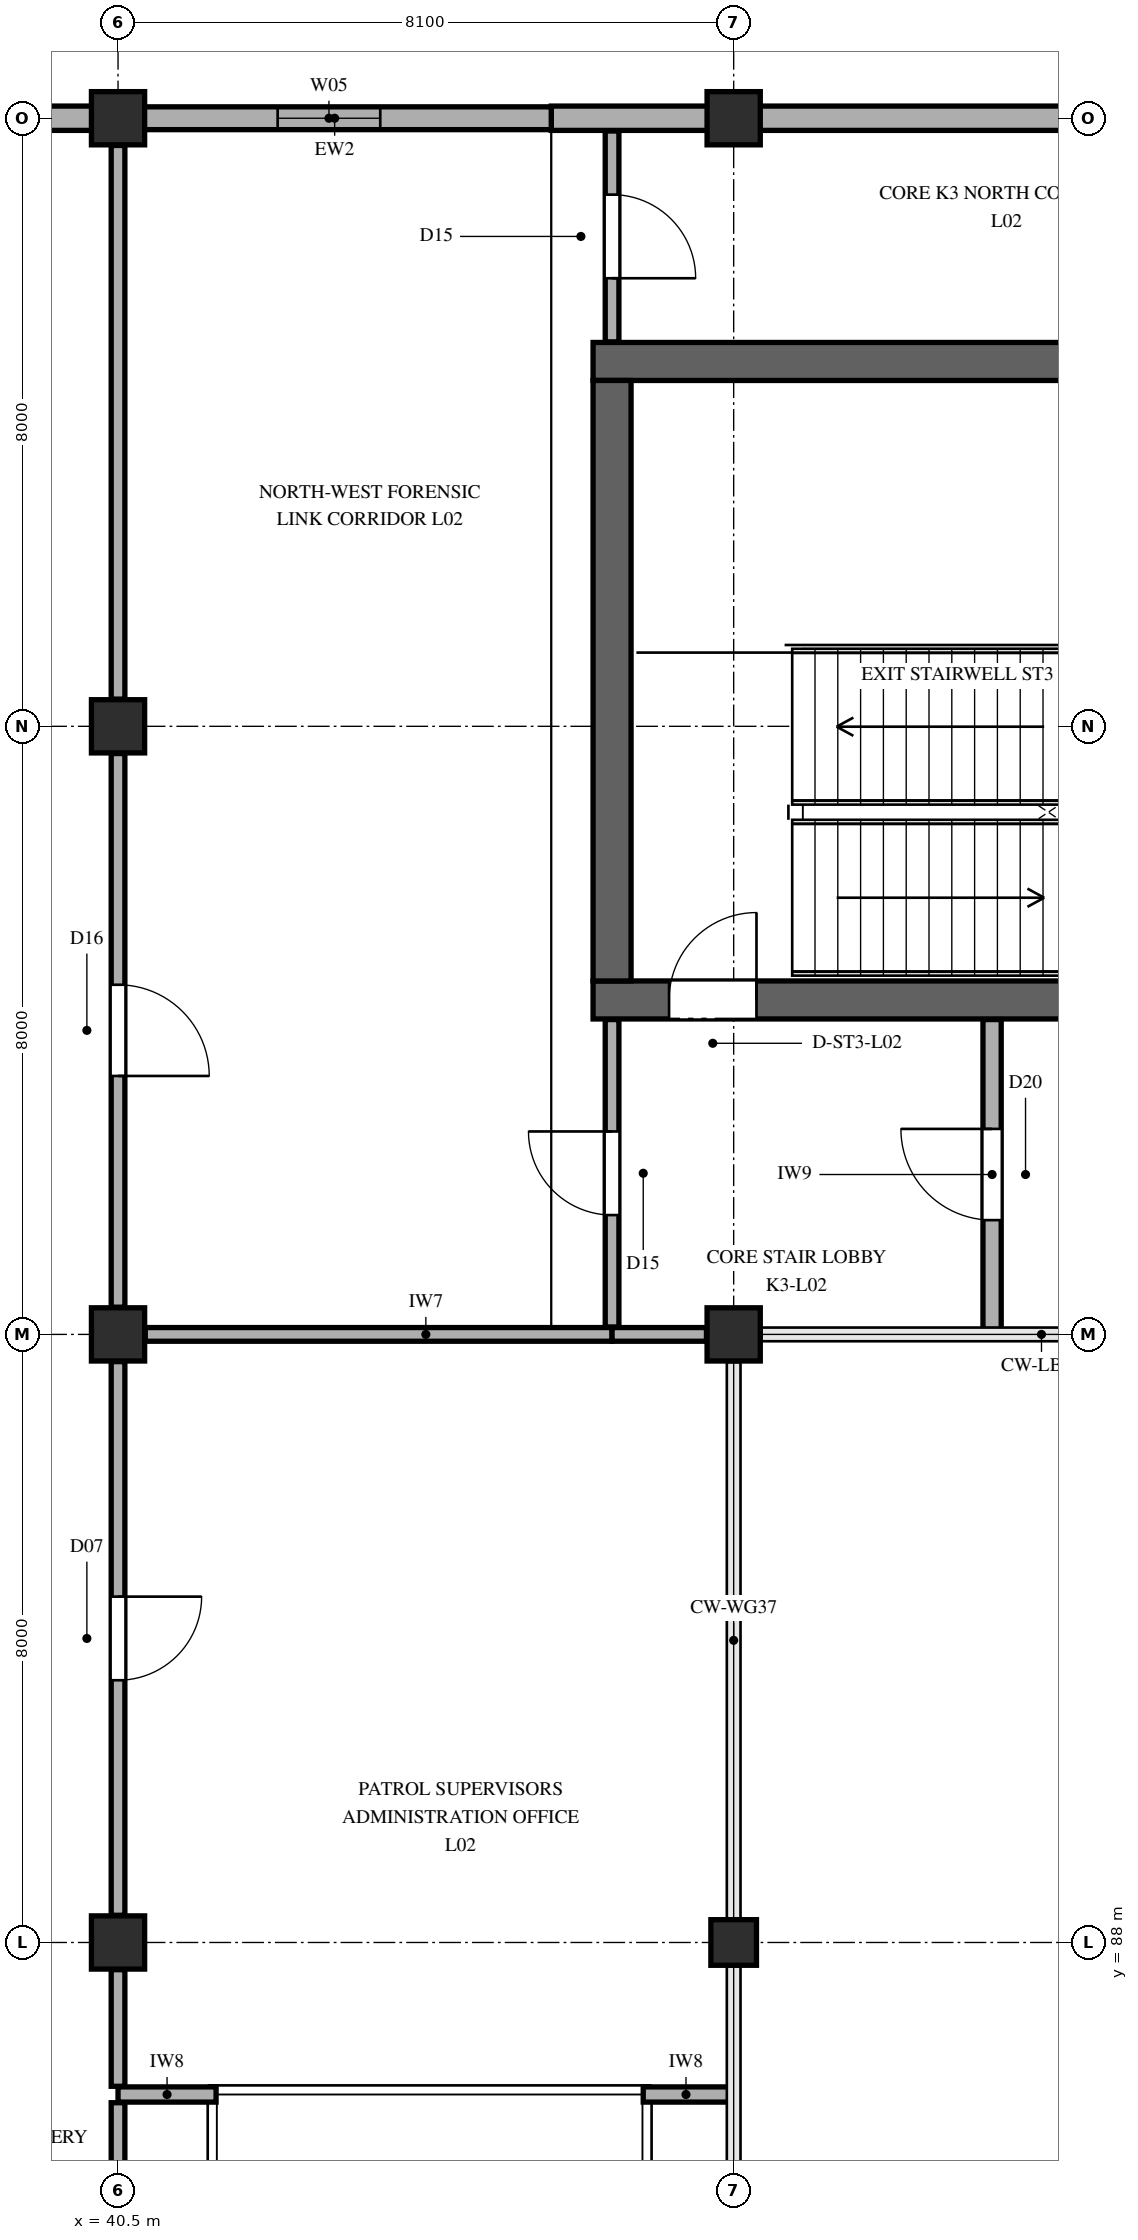
"""IFC4 building model, lengths in metres.
Left out: names, types, materials, properties, quantities, classifications, styles, units other than length and angle.
Written with IfcOpenShell. Run it as: python <this file> out.ifc"""

import sys

from ifc_helpers import new_model, si_unit, direction, frame, frame_2d, origin, origin_2d, place, context, subcontext, project, spatial, rectangle, extrude, element, fill, save


model = new_model("IFC4")
c1 = context("Model", 3, precision=1e-05, world=origin(), true_north=direction((0.0, 1.0)))
c2 = subcontext(c1, "Body", "Model", "MODEL_VIEW")
j1 = project(units=[si_unit("LENGTHUNIT", "METRE"), si_unit("PLANEANGLEUNIT", "RADIAN")], contexts=[c1])
p1 = place(None, origin())
s1 = spatial("IfcSite", under=j1, at=p1, CompositionType="ELEMENT")
p2 = place(p1, origin())
s2 = spatial("IfcBuilding", under=s1, at=p2, CompositionType="ELEMENT")
p3 = place(p2, frame((0.0, 0.0, 10.2)))
s3 = spatial("IfcBuildingStorey", under=s2, at=p3, CompositionType="ELEMENT", Elevation=10.2)
p4 = place(p3, frame((46.75, 100.4, 0.0), z_axis=(0.0, 0.0, 1.0), x_axis=(1.0, 0.0, 0.0)))
e1 = element("IfcWall", 1, at=p4, inside=s3, PredefinedType="SHEAR", context=c2, shape_type="SweptSolid", body=[
    extrude(rectangle(XDim=15.3, YDim=0.5, at=frame_2d((7.65, 0.0))), origin(), (0.0, 0.0, 1.0), 4.5),
])
p5 = place(p4, frame((1.0, 0.0, 0.0)))
e2 = element("IfcOpeningElement", 2, at=p5, cuts=e1, PredefinedType="OPENING", context=c2, shape_type="SweptSolid", body=[
    extrude(rectangle(XDim=1.15, YDim=2.25, at=frame_2d((0.575, 1.125))), frame((0.0, 0.26, 0.0), z_axis=(0.0, -1.0, 0.0), x_axis=(1.0, 0.0, 0.0)), (0.0, 0.0, 1.0), 0.52),
])
p6 = place(p4, frame((10.282, 0.0, 0.0)))
e3 = element("IfcOpeningElement", 3, at=p6, cuts=e1, PredefinedType="OPENING", context=c2, shape_type="SweptSolid", body=[
    extrude(rectangle(XDim=1.1, YDim=2.2, at=frame_2d((0.55, 1.1))), frame((0.0, 0.26, 0.0), z_axis=(0.0, -1.0, 0.0), x_axis=(1.0, 0.0, 0.0)), (0.0, 0.0, 1.0), 0.52),
])
p7 = place(p4, frame((12.998, 0.0, 0.0)))
e4 = element("IfcOpeningElement", 4, at=p7, cuts=e1, PredefinedType="OPENING", context=c2, shape_type="SweptSolid", body=[
    extrude(rectangle(XDim=1.1, YDim=2.2, at=frame_2d((0.55, 1.1))), frame((0.0, 0.26, 0.0), z_axis=(0.0, -1.0, 0.0), x_axis=(1.0, 0.0, 0.0)), (0.0, 0.0, 1.0), 0.52),
])
p8 = place(p3, frame((46.75, 108.8, 0.0), z_axis=(0.0, 0.0, 1.0), x_axis=(1.0, 0.0, 0.0)))
e5 = element("IfcWall", 5, at=p8, inside=s3, PredefinedType="SHEAR", context=c2, shape_type="SweptSolid", body=[
    extrude(rectangle(XDim=15.3, YDim=0.5, at=frame_2d((7.65, 0.0))), origin(), (0.0, 0.0, 1.0), 4.5),
])
p9 = place(p3, frame((47.0, 100.65, 0.0), z_axis=(0.0, 0.0, 1.0), x_axis=(0.0, 1.0, 0.0)))
e6 = element("IfcWall", 6, at=p9, inside=s3, PredefinedType="SHEAR", context=c2, shape_type="SweptSolid", body=[
    extrude(rectangle(XDim=7.9, YDim=0.5, at=frame_2d((3.95, 0.0))), origin(), (0.0, 0.0, 1.0), 4.5),
])
for number, where, z_axis, x_axis in (
    (7, (40.5, 88.0, 0.0), (0.0, 0.0, 1.0), (1.0, 0.0, 0.0)),
    (8, (40.5, 96.0, 0.0), (0.0, 0.0, 1.0), (1.0, 0.0, 0.0)),
    (9, (40.5, 104.0, 0.0), (0.0, 0.0, 1.0), (1.0, 0.0, 0.0)),
    (10, (40.5, 112.0, 0.0), (0.0, 0.0, 1.0), (1.0, 0.0, 0.0)),
):
    element("IfcColumn", number, at=place(p3, frame(where, z_axis=z_axis, x_axis=x_axis)), inside=s3, PredefinedType="COLUMN", context=c2, shape_type="SweptSolid", body=[
        extrude(rectangle(XDim=0.7, YDim=0.7, at=origin_2d()), origin(), (0.0, 0.0, 1.0), 4.5),
    ])
p10 = place(p3, frame((48.6, 88.0, 0.0), z_axis=(0.0, 0.0, 1.0), x_axis=(1.0, 0.0, 0.0)))
e11 = element("IfcColumn", 11, at=p10, inside=s3, PredefinedType="COLUMN", context=c2, shape_type="SweptSolid", body=[
    extrude(rectangle(XDim=0.6, YDim=0.6, at=origin_2d()), origin(), (0.0, 0.0, 1.0), 4.5),
])
for number, where, z_axis, x_axis in (
    (12, (48.6, 96.0, 0.0), (0.0, 0.0, 1.0), (1.0, 0.0, 0.0)),
    (13, (48.6, 112.0, 0.0), (0.0, 0.0, 1.0), (1.0, 0.0, 0.0)),
):
    element("IfcColumn", number, at=place(p3, frame(where, z_axis=z_axis, x_axis=x_axis)), inside=s3, PredefinedType="COLUMN", context=c2, shape_type="SweptSolid", body=[
        extrude(rectangle(XDim=0.7, YDim=0.7, at=origin_2d()), origin(), (0.0, 0.0, 1.0), 4.5),
    ])
p11 = place(p3, frame((62.775, 112.0, 0.0), z_axis=(0.0, 0.0, 1.0), x_axis=(-1.0, 0.0, 0.0)))
e14 = element("IfcWall", 14, at=p11, inside=s3, PredefinedType="SOLIDWALL", context=c2, shape_type="SweptSolid", body=[
    extrude(rectangle(XDim=14.175, YDim=0.32, at=frame_2d((7.087, 0.0))), origin(), (0.0, 0.0, 1.0), 3.632),
])
p12 = place(p11, frame((8.55, 0.0, 0.95)))
e15 = element("IfcOpeningElement", 15, at=p12, cuts=e14, PredefinedType="OPENING", context=c2, shape_type="SweptSolid", body=[
    extrude(rectangle(XDim=1.2, YDim=1.8, at=frame_2d((0.6, 0.9))), frame((0.0, 0.17, 0.0), z_axis=(0.0, -1.0, 0.0), x_axis=(1.0, 0.0, 0.0)), (0.0, 0.0, 1.0), 0.34),
])
p13 = place(p3, frame((48.6, 112.0, 0.0), z_axis=(0.0, 0.0, 1.0), x_axis=(-1.0, 0.0, 0.0)))
e16 = element("IfcWall", 16, at=p13, inside=s3, PredefinedType="SOLIDWALL", context=c2, shape_type="SweptSolid", body=[
    extrude(rectangle(XDim=2.4, YDim=0.32, at=frame_2d((1.2, 0.0))), origin(), (0.0, 0.0, 1.0), 3.699),
])
p14 = place(p3, frame((46.2, 112.0, 0.0), z_axis=(0.0, 0.0, 1.0), x_axis=(-1.0, 0.0, 0.0)))
e17 = element("IfcWall", 17, at=p14, inside=s3, PredefinedType="SOLIDWALL", context=c2, shape_type="SweptSolid", body=[
    extrude(rectangle(XDim=5.7, YDim=0.3, at=frame_2d((2.85, 0.0))), origin(), (0.0, 0.0, 1.0), 3.699),
])
p15 = place(p14, frame((2.25, 0.0, 0.95)))
e18 = element("IfcOpeningElement", 18, at=p15, cuts=e17, PredefinedType="OPENING", context=c2, shape_type="SweptSolid", body=[
    extrude(rectangle(XDim=1.35, YDim=1.8, at=frame_2d((0.675, 0.9))), frame((0.0, 0.16, 0.0), z_axis=(0.0, -1.0, 0.0), x_axis=(1.0, 0.0, 0.0)), (0.0, 0.0, 1.0), 0.32),
])
p16 = place(p3, frame((40.5, 112.0, 0.0), z_axis=(0.0, 0.0, 1.0), x_axis=(-1.0, 0.0, 0.0)))
e19 = element("IfcWall", 19, at=p16, inside=s3, PredefinedType="SOLIDWALL", context=c2, shape_type="SweptSolid", body=[
    extrude(rectangle(XDim=12.15, YDim=0.32, at=frame_2d((6.075, 0.0))), origin(), (0.0, 0.0, 1.0), 3.632),
])
p17 = place(p16, frame((5.4, 0.0, 0.85)))
e20 = element("IfcOpeningElement", 20, at=p17, cuts=e19, PredefinedType="OPENING", context=c2, shape_type="SweptSolid", body=[
    extrude(rectangle(XDim=1.35, YDim=2.1, at=frame_2d((0.675, 1.05))), frame((0.0, 0.17, 0.0), z_axis=(0.0, -1.0, 0.0), x_axis=(1.0, 0.0, 0.0)), (0.0, 0.0, 1.0), 0.34),
])
p18 = place(p3, frame((40.5, 86.0, 0.0), z_axis=(0.0, 0.0, 1.0), x_axis=(1.0, 0.0, 0.0)))
e21 = element("IfcWall", 21, at=p18, inside=s3, PredefinedType="PARTITIONING", context=c2, shape_type="SweptSolid", body=[
    extrude(rectangle(XDim=1.29, YDim=0.2, at=frame_2d((0.645, 0.0))), origin(), (0.0, 0.0, 1.0), 4.24),
])
p19 = place(p3, frame((47.41, 86.0, 0.0), z_axis=(0.0, 0.0, 1.0), x_axis=(1.0, 0.0, 0.0)))
e22 = element("IfcWall", 22, at=p19, inside=s3, PredefinedType="PARTITIONING", context=c2, shape_type="SweptSolid", body=[
    extrude(rectangle(XDim=1.125, YDim=0.2, at=frame_2d((0.562, 0.0))), origin(), (0.0, 0.0, 1.0), 4.24),
])
p20 = place(p3, frame((40.858, 96.0, 0.0), z_axis=(0.0, 0.0, 1.0), x_axis=(1.0, 0.0, 0.0)))
e23 = element("IfcWall", 23, at=p20, inside=s3, PredefinedType="PARTITIONING", context=c2, shape_type="SweptSolid", body=[
    extrude(rectangle(XDim=6.142, YDim=0.18, at=frame_2d((3.071, 0.0))), origin(), (0.0, 0.0, 1.0), 3.632),
])
p21 = place(p3, frame((47.0, 96.0, 0.0), z_axis=(0.0, 0.0, 1.0), x_axis=(1.0, 0.0, 0.0)))
e24 = element("IfcWall", 24, at=p21, inside=s3, PredefinedType="PARTITIONING", context=c2, shape_type="SweptSolid", body=[
    extrude(rectangle(XDim=1.242, YDim=0.18, at=frame_2d((0.621, 0.0))), origin(), (0.0, 0.0, 1.0), 3.632),
])
p22 = place(p3, frame((40.5, 80.358, 0.0), z_axis=(0.0, 0.0, 1.0), x_axis=(0.0, 1.0, 0.0)))
e25 = element("IfcWall", 25, at=p22, inside=s3, PredefinedType="PARTITIONING", context=c2, shape_type="SweptSolid", body=[
    extrude(rectangle(XDim=5.534, YDim=0.18, at=frame_2d((2.767, 0.0))), origin(), (0.0, 0.0, 1.0), 3.769),
])
p23 = place(p3, frame((40.5, 86.108, 0.0), z_axis=(0.0, 0.0, 1.0), x_axis=(0.0, 1.0, 0.0)))
e26 = element("IfcWall", 26, at=p23, inside=s3, PredefinedType="PARTITIONING", context=c2, shape_type="SweptSolid", body=[
    extrude(rectangle(XDim=1.534, YDim=0.18, at=frame_2d((0.767, 0.0))), origin(), (0.0, 0.0, 1.0), 3.769),
])
p24 = place(p3, frame((40.5, 88.358, 0.0), z_axis=(0.0, 0.0, 1.0), x_axis=(0.0, 1.0, 0.0)))
e27 = element("IfcWall", 27, at=p24, inside=s3, PredefinedType="PARTITIONING", context=c2, shape_type="SweptSolid", body=[
    extrude(rectangle(XDim=7.284, YDim=0.18, at=frame_2d((3.642, 0.0))), origin(), (0.0, 0.0, 1.0), 3.732),
])
p25 = place(p24, frame((3.092, 0.0, 0.0)))
e28 = element("IfcOpeningElement", 28, at=p25, cuts=e27, PredefinedType="OPENING", context=c2, shape_type="SweptSolid", body=[
    extrude(rectangle(XDim=1.1, YDim=2.2, at=frame_2d((0.55, 1.1))), frame((0.0, 0.1, 0.0), z_axis=(0.0, -1.0, 0.0), x_axis=(1.0, 0.0, 0.0)), (0.0, 0.0, 1.0), 0.2),
])
p26 = place(p3, frame((40.5, 96.358, 0.0), z_axis=(0.0, 0.0, 1.0), x_axis=(0.0, 1.0, 0.0)))
e29 = element("IfcWall", 29, at=p26, inside=s3, PredefinedType="PARTITIONING", context=c2, shape_type="SweptSolid", body=[
    extrude(rectangle(XDim=7.284, YDim=0.18, at=frame_2d((3.642, 0.0))), origin(), (0.0, 0.0, 1.0), 3.769),
])
p27 = place(p26, frame((3.042, 0.0, 0.0)))
e30 = element("IfcOpeningElement", 30, at=p27, cuts=e29, PredefinedType="OPENING", context=c2, shape_type="SweptSolid", body=[
    extrude(rectangle(XDim=1.2, YDim=2.2, at=frame_2d((0.6, 1.1))), frame((0.0, 0.1, 0.0), z_axis=(0.0, -1.0, 0.0), x_axis=(1.0, 0.0, 0.0)), (0.0, 0.0, 1.0), 0.2),
])
p28 = place(p3, frame((40.5, 104.358, 0.0), z_axis=(0.0, 0.0, 1.0), x_axis=(0.0, 1.0, 0.0)))
e31 = element("IfcWall", 31, at=p28, inside=s3, PredefinedType="PARTITIONING", context=c2, shape_type="SweptSolid", body=[
    extrude(rectangle(XDim=7.284, YDim=0.18, at=frame_2d((3.642, 0.0))), origin(), (0.0, 0.0, 1.0), 3.769),
])
p29 = place(p3, frame((47.0, 96.098, 0.0), z_axis=(0.0, 0.0, 1.0), x_axis=(0.0, 1.0, 0.0)))
e32 = element("IfcWall", 32, at=p29, inside=s3, PredefinedType="PARTITIONING", context=c2, shape_type="SweptSolid", body=[
    extrude(rectangle(XDim=4.044, YDim=0.18, at=frame_2d((2.022, 0.0))), origin(), (0.0, 0.0, 1.0), 4.24),
])
p30 = place(p29, frame((1.472, 0.0, 0.0)))
e33 = element("IfcOpeningElement", 33, at=p30, cuts=e32, PredefinedType="OPENING", context=c2, shape_type="SweptSolid", body=[
    extrude(rectangle(XDim=1.1, YDim=2.2, at=frame_2d((0.55, 1.1))), frame((0.0, 0.1, 0.0), z_axis=(0.0, -1.0, 0.0), x_axis=(1.0, 0.0, 0.0)), (0.0, 0.0, 1.0), 0.2),
])
p31 = place(p3, frame((47.0, 109.058, 0.0), z_axis=(0.0, 0.0, 1.0), x_axis=(0.0, 1.0, 0.0)))
e34 = element("IfcWall", 34, at=p31, inside=s3, PredefinedType="PARTITIONING", context=c2, shape_type="SweptSolid", body=[
    extrude(rectangle(XDim=2.774, YDim=0.18, at=frame_2d((1.387, 0.0))), origin(), (0.0, 0.0, 1.0), 4.24),
])
p32 = place(p31, frame((0.837, 0.0, 0.0)))
e35 = element("IfcOpeningElement", 35, at=p32, cuts=e34, PredefinedType="OPENING", context=c2, shape_type="SweptSolid", body=[
    extrude(rectangle(XDim=1.1, YDim=2.2, at=frame_2d((0.55, 1.1))), frame((0.0, 0.1, 0.0), z_axis=(0.0, -1.0, 0.0), x_axis=(1.0, 0.0, 0.0)), (0.0, 0.0, 1.0), 0.2),
])
p33 = place(p3, frame((52.0, 96.065, 0.0), z_axis=(0.0, 0.0, 1.0), x_axis=(0.0, 1.0, 0.0)))
e36 = element("IfcWall", 36, at=p33, inside=s3, PredefinedType="PARTITIONING", context=c2, shape_type="SweptSolid", body=[
    extrude(rectangle(XDim=4.077, YDim=0.24, at=frame_2d((2.039, 0.0))), origin(), (0.0, 0.0, 1.0), 4.24),
])
p34 = place(p33, frame((1.438, 0.0, 0.0)))
e37 = element("IfcOpeningElement", 37, at=p34, cuts=e36, PredefinedType="OPENING", context=c2, shape_type="SweptSolid", body=[
    extrude(rectangle(XDim=1.2, YDim=2.3, at=frame_2d((0.6, 1.15))), frame((0.0, 0.13, 0.0), z_axis=(0.0, -1.0, 0.0), x_axis=(1.0, 0.0, 0.0)), (0.0, 0.0, 1.0), 0.26),
])
p35 = place(p15, origin())
e38 = element("IfcWindow", 38, at=p35, inside=s3, PartitioningType="DOUBLE_PANEL_VERTICAL", PredefinedType="WINDOW", context=c2, shape_type="SweptSolid", body=[
    extrude(rectangle(XDim=1.35, YDim=1.8, at=frame_2d((0.675, 0.9))), frame((0.0, 0.03, 0.0), z_axis=(0.0, -1.0, 0.0), x_axis=(1.0, 0.0, 0.0)), (0.0, 0.0, 1.0), 0.06),
])
fill(e18, e38)
p36 = place(p5, origin())
e39 = element("IfcDoor", 39, at=p36, inside=s3, OperationType="SINGLE_SWING_RIGHT", PredefinedType="DOOR", context=c2, shape_type="SweptSolid", body=[
    extrude(rectangle(XDim=1.15, YDim=2.25, at=frame_2d((0.575, 1.125))), frame((0.0, 0.025, 0.0), z_axis=(0.0, -1.0, 0.0), x_axis=(1.0, 0.0, 0.0)), (0.0, 0.0, 1.0), 0.05),
])
fill(e2, e39)
p37 = place(p25, frame((1.1, 0.0, 0.0), z_axis=(0.0, 0.0, 1.0), x_axis=(-1.0, 0.0, 0.0)))
e40 = element("IfcDoor", 40, at=p37, inside=s3, OperationType="SINGLE_SWING_RIGHT", PredefinedType="DOOR", context=c2, shape_type="SweptSolid", body=[
    extrude(rectangle(XDim=1.1, YDim=2.2, at=frame_2d((0.55, 1.1))), frame((0.0, 0.025, 0.0), z_axis=(0.0, -1.0, 0.0), x_axis=(1.0, 0.0, 0.0)), (0.0, 0.0, 1.0), 0.05),
])
fill(e28, e40)
p38 = place(p27, frame((1.2, 0.0, 0.0), z_axis=(0.0, 0.0, 1.0), x_axis=(-1.0, 0.0, 0.0)))
e41 = element("IfcDoor", 41, at=p38, inside=s3, OperationType="SINGLE_SWING_LEFT", PredefinedType="DOOR", context=c2, shape_type="SweptSolid", body=[
    extrude(rectangle(XDim=1.2, YDim=2.2, at=frame_2d((0.6, 1.1))), frame((0.0, 0.025, 0.0), z_axis=(0.0, -1.0, 0.0), x_axis=(1.0, 0.0, 0.0)), (0.0, 0.0, 1.0), 0.05),
])
fill(e30, e41)
p39 = place(p30, origin())
e42 = element("IfcDoor", 42, at=p39, inside=s3, OperationType="SINGLE_SWING_RIGHT", PredefinedType="DOOR", context=c2, shape_type="SweptSolid", body=[
    extrude(rectangle(XDim=1.1, YDim=2.2, at=frame_2d((0.55, 1.1))), frame((0.0, 0.025, 0.0), z_axis=(0.0, -1.0, 0.0), x_axis=(1.0, 0.0, 0.0)), (0.0, 0.0, 1.0), 0.05),
])
fill(e33, e42)
p40 = place(p32, frame((1.1, 0.0, 0.0), z_axis=(0.0, 0.0, 1.0), x_axis=(-1.0, 0.0, 0.0)))
e43 = element("IfcDoor", 43, at=p40, inside=s3, OperationType="SINGLE_SWING_LEFT", PredefinedType="DOOR", context=c2, shape_type="SweptSolid", body=[
    extrude(rectangle(XDim=1.1, YDim=2.2, at=frame_2d((0.55, 1.1))), frame((0.0, 0.025, 0.0), z_axis=(0.0, -1.0, 0.0), x_axis=(1.0, 0.0, 0.0)), (0.0, 0.0, 1.0), 0.05),
])
fill(e35, e43)
p41 = place(p34, origin())
e44 = element("IfcDoor", 44, at=p41, inside=s3, OperationType="SINGLE_SWING_RIGHT", PredefinedType="DOOR", context=c2, shape_type="SweptSolid", body=[
    extrude(rectangle(XDim=1.2, YDim=2.3, at=frame_2d((0.6, 1.15))), frame((0.0, 0.025, 0.0), z_axis=(0.0, -1.0, 0.0), x_axis=(1.0, 0.0, 0.0)), (0.0, 0.0, 1.0), 0.05),
])
fill(e37, e44)
save(model, sys.argv[1])
